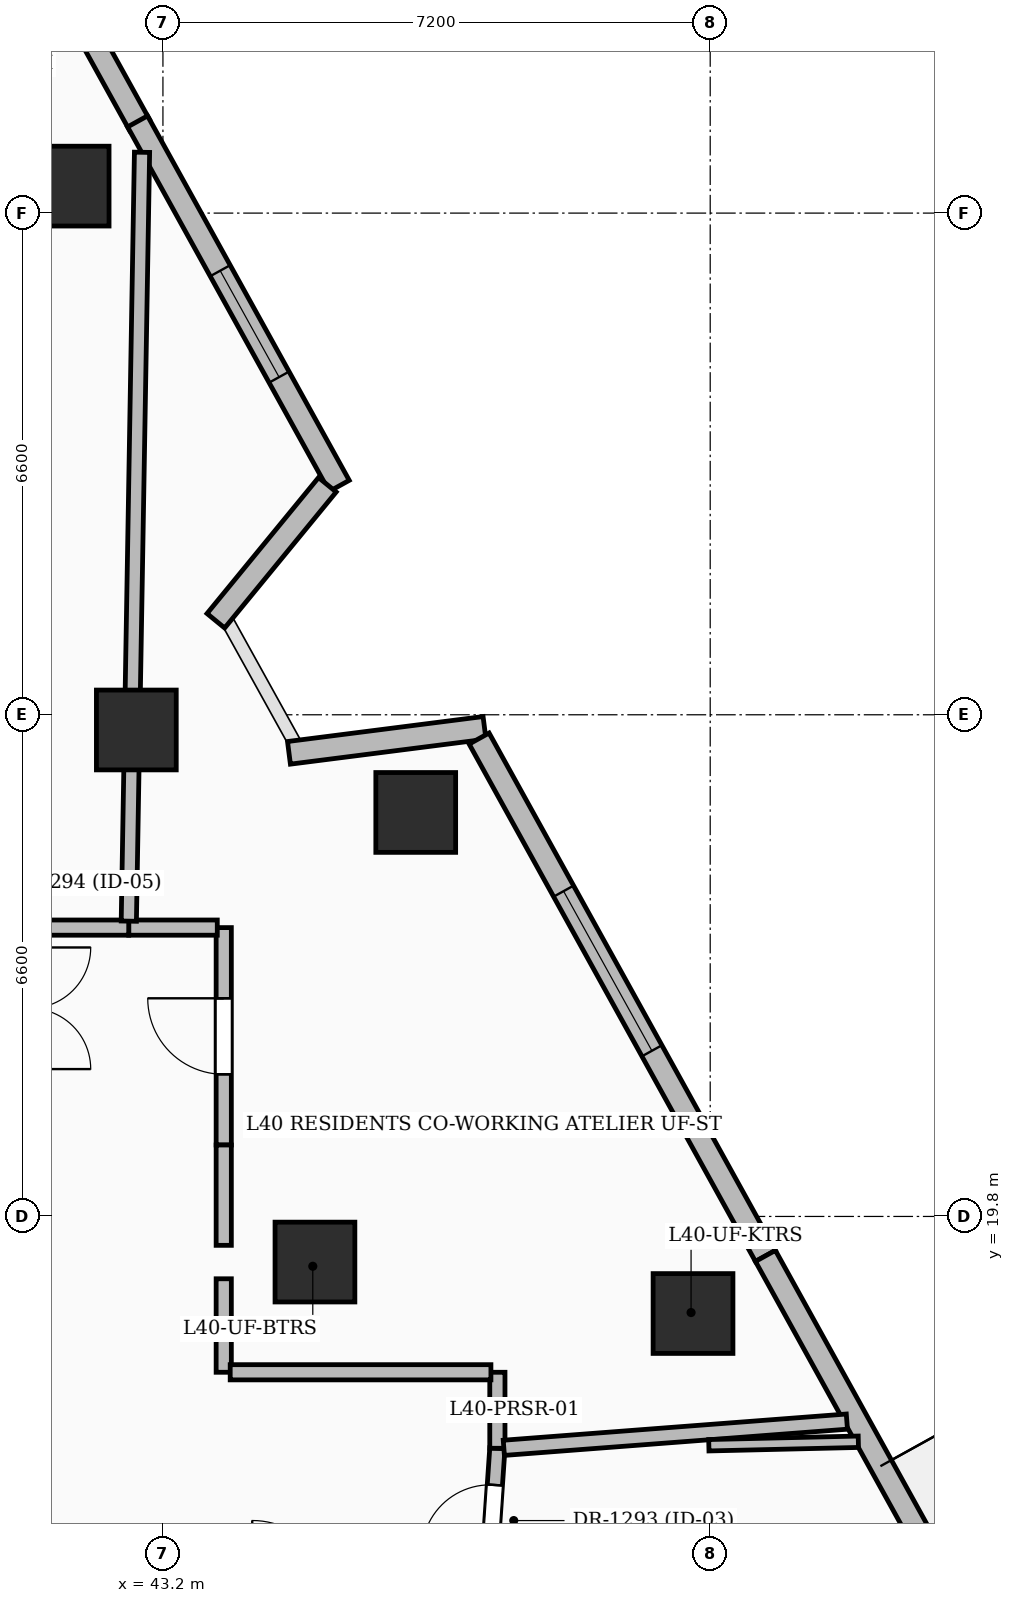
"""IFC4 building model, lengths in metres.
Left out: names, types, materials, properties, quantities, classifications, styles, units other than length and angle.
Written with IfcOpenShell. Run it as: python <this file> out.ifc"""

import sys

from ifc_helpers import new_model, si_unit, direction, frame, frame_2d, origin, origin_2d, place, context, subcontext, project, spatial, rectangle, extrude, element, fill, save


model = new_model("IFC4")
c1 = context("Model", 3, precision=1e-05, world=origin(), true_north=direction((0.0, 1.0)))
c2 = subcontext(c1, "Body", "Model", "MODEL_VIEW")
j1 = project(units=[si_unit("LENGTHUNIT", "METRE"), si_unit("PLANEANGLEUNIT", "RADIAN")], contexts=[c1])
p1 = place(None, origin())
s1 = spatial("IfcSite", under=j1, at=p1, CompositionType="ELEMENT")
p2 = place(p1, origin())
s2 = spatial("IfcBuilding", under=s1, at=p2, CompositionType="ELEMENT")
p3 = place(p2, frame((0.0, 0.0, 157.2)))
s3 = spatial("IfcBuildingStorey", under=s2, at=p3, CompositionType="ELEMENT", Elevation=157.2)
for number, where, z_axis, x_axis in (
    (1, (45.2, 19.2, 0.0), (0.0, 0.0, 1.0), (1.0, 0.0, 0.0)),
    (2, (42.85, 26.2, 0.0), (0.0, 0.0, 1.0), (1.0, 0.0, 0.0)),
    (3, (50.174, 18.523, 0.0), (0.0, 0.0, 1.0), (1.0, 0.0, 0.0)),
    (4, (46.526, 25.115, 0.0), (0.0, 0.0, 1.0), (1.0, 0.0, 0.0)),
    (5, (41.966, 33.355, 0.0), (0.0, 0.0, 1.0), (1.0, 0.0, 0.0)),
):
    element("IfcColumn", number, at=place(p3, frame(where, z_axis=z_axis, x_axis=x_axis)), inside=s3, PredefinedType="COLUMN", context=c2, shape_type="SweptSolid", body=[
        extrude(rectangle(XDim=1.05, YDim=1.05, at=origin_2d()), origin(), (0.0, 0.0, 1.0), 3.6),
    ])
p4 = place(p3, frame((40.155, 39.106, 0.0), z_axis=(0.0, 0.0, 1.0), x_axis=(0.484204903903, -0.874954633702, 0.0)))
e6 = element("IfcWall", 6, at=p4, inside=s3, PredefinedType="SOLIDWALL", context=c2, shape_type="SweptSolid", body=[
    extrude(rectangle(XDim=5.653, YDim=0.3, at=frame_2d((2.827, 0.0))), origin(), (0.0, 0.0, 1.0), 3.35),
])
p5 = place(p4, frame((1.91, 0.0, 0.6)))
e7 = element("IfcOpeningElement", 7, at=p5, cuts=e6, PredefinedType="OPENING", context=c2, shape_type="SweptSolid", body=[
    extrude(rectangle(XDim=1.8, YDim=2.1, at=frame_2d((0.9, 1.05))), frame((0.0, 0.16, 0.0), z_axis=(0.0, -1.0, 0.0), x_axis=(1.0, 0.0, 0.0)), (0.0, 0.0, 1.0), 0.32),
])
p6 = place(p3, frame((42.866, 34.206, 0.0), z_axis=(0.0, 0.0, 1.0), x_axis=(0.484193476584, -0.874960957548, 0.0)))
e8 = element("IfcWall", 8, at=p6, inside=s3, PredefinedType="SOLIDWALL", context=c2, shape_type="SweptSolid", body=[
    extrude(rectangle(XDim=5.48, YDim=0.3, at=frame_2d((2.74, 0.0))), origin(), (0.0, 0.0, 1.0), 3.35),
])
p7 = place(p6, frame((2.245, 0.0, 0.55)))
e9 = element("IfcOpeningElement", 9, at=p7, cuts=e8, PredefinedType="OPENING", context=c2, shape_type="SweptSolid", body=[
    extrude(rectangle(XDim=1.6, YDim=2.2, at=frame_2d((0.8, 1.1))), frame((0.0, 0.16, 0.0), z_axis=(0.0, -1.0, 0.0), x_axis=(1.0, 0.0, 0.0)), (0.0, 0.0, 1.0), 0.32),
])
p8 = place(p3, frame((45.363, 29.426, 0.0), z_axis=(0.0, 0.0, 1.0), x_axis=(-0.634082112051, -0.773265720937, 0.0)))
e10 = element("IfcWall", 10, at=p8, inside=s3, PredefinedType="SOLIDWALL", context=c2, shape_type="SweptSolid", body=[
    extrude(rectangle(XDim=2.314, YDim=0.3, at=frame_2d((1.157, 0.0))), origin(), (0.0, 0.0, 1.0), 2.575),
])
p9 = place(p3, frame((44.858, 25.899, 0.0), z_axis=(0.0, 0.0, 1.0), x_axis=(0.991953049751, 0.126606267974, 0.0)))
e11 = element("IfcWall", 11, at=p9, inside=s3, PredefinedType="SOLIDWALL", context=c2, shape_type="SweptSolid", body=[
    extrude(rectangle(XDim=2.594, YDim=0.3, at=frame_2d((1.297, 0.0))), origin(), (0.0, 0.0, 1.0), 2.575),
])
p10 = place(p3, frame((47.36, 26.087, 0.0), z_axis=(0.0, 0.0, 1.0), x_axis=(0.484182040501, -0.874967286049, 0.0)))
e12 = element("IfcWall", 12, at=p10, inside=s3, PredefinedType="SOLIDWALL", context=c2, shape_type="SweptSolid", body=[
    extrude(rectangle(XDim=7.779, YDim=0.3, at=frame_2d((3.89, 0.0))), origin(), (0.0, 0.0, 1.0), 3.35),
])
p11 = place(p10, frame((2.295, 0.0, 0.6)))
e13 = element("IfcOpeningElement", 13, at=p11, cuts=e12, PredefinedType="OPENING", context=c2, shape_type="SweptSolid", body=[
    extrude(rectangle(XDim=2.4, YDim=2.1, at=frame_2d((1.2, 1.05))), frame((0.0, 0.16, 0.0), z_axis=(0.0, -1.0, 0.0), x_axis=(1.0, 0.0, 0.0)), (0.0, 0.0, 1.0), 0.32),
])
p12 = place(p3, frame((51.126, 19.281, 0.0), z_axis=(0.0, 0.0, 1.0), x_axis=(0.484181305153, -0.87496769297, 0.0)))
e14 = element("IfcWall", 14, at=p12, inside=s3, PredefinedType="SOLIDWALL", context=c2, shape_type="SweptSolid", body=[
    extrude(rectangle(XDim=8.059, YDim=0.3, at=frame_2d((4.03, 0.0))), origin(), (0.0, 0.0, 1.0), 3.35),
])
p13 = place(p12, frame((5.335, 0.0, 0.0)))
e15 = element("IfcOpeningElement", 15, at=p13, cuts=e14, PredefinedType="OPENING", context=c2, shape_type="SweptSolid", body=[
    extrude(rectangle(XDim=1.0, YDim=2.2, at=frame_2d((0.5, 1.1))), frame((0.0, 0.16, 0.0), z_axis=(0.0, -1.0, 0.0), x_axis=(1.0, 0.0, 0.0)), (0.0, 0.0, 1.0), 0.32),
])
p14 = place(p3, frame((47.425, 14.2, 0.0), z_axis=(0.0, 0.0, 1.0), x_axis=(0.068484119878, 0.997652206595, 0.0)))
e16 = element("IfcWall", 16, at=p14, inside=s3, PredefinedType="PARTITIONING", context=c2, shape_type="SweptSolid", body=[
    extrude(rectangle(XDim=2.556, YDim=0.2, at=frame_2d((1.278, 0.0))), origin(), (0.0, 0.0, 1.0), 2.393),
])
p15 = place(p14, frame((1.172, 0.0, 0.0)))
e17 = element("IfcOpeningElement", 17, at=p15, cuts=e16, PredefinedType="OPENING", context=c2, shape_type="SweptSolid", body=[
    extrude(rectangle(XDim=0.9, YDim=2.1, at=frame_2d((0.45, 1.05))), frame((0.0, 0.11, 0.0), z_axis=(0.0, -1.0, 0.0), x_axis=(1.0, 0.0, 0.0)), (0.0, 0.0, 1.0), 0.22),
])
p16 = place(p3, frame((44.0, 20.74, 0.0), z_axis=(0.0, 0.0, 1.0), x_axis=(0.0, 1.0, 0.0)))
e18 = element("IfcWall", 18, at=p16, inside=s3, PredefinedType="PARTITIONING", context=c2, shape_type="SweptSolid", body=[
    extrude(rectangle(XDim=2.86, YDim=0.2, at=frame_2d((1.43, 0.0))), origin(), (0.0, 0.0, 1.0), 2.436),
])
p17 = place(p16, frame((0.93, 0.0, 0.0)))
e19 = element("IfcOpeningElement", 19, at=p17, cuts=e18, PredefinedType="OPENING", context=c2, shape_type="SweptSolid", body=[
    extrude(rectangle(XDim=1.0, YDim=2.2, at=frame_2d((0.5, 1.1))), frame((0.0, 0.11, 0.0), z_axis=(0.0, -1.0, 0.0), x_axis=(1.0, 0.0, 0.0)), (0.0, 0.0, 1.0), 0.22),
])
p18 = place(p3, frame((43.915, 23.6, 0.0), z_axis=(0.0, 0.0, 1.0), x_axis=(-1.0, 0.0, 0.0)))
e20 = element("IfcWall", 20, at=p18, inside=s3, PredefinedType="PARTITIONING", context=c2, shape_type="SweptSolid", body=[
    extrude(rectangle(XDim=1.165, YDim=0.2, at=frame_2d((0.583, 0.0))), origin(), (0.0, 0.0, 1.0), 2.436),
])
p19 = place(p3, frame((47.6, 16.75, 0.0), z_axis=(0.0, 0.0, 1.0), x_axis=(0.0, 1.0, 0.0)))
e21 = element("IfcWall", 21, at=p19, inside=s3, PredefinedType="PARTITIONING", context=c2, shape_type="SweptSolid", body=[
    extrude(rectangle(XDim=1.0, YDim=0.2, at=frame_2d((0.5, 0.0))), origin(), (0.0, 0.0, 1.0), 3.01),
])
p20 = place(p3, frame((44.0, 17.75, 0.0), z_axis=(0.0, 0.0, 1.0), x_axis=(0.0, 1.0, 0.0)))
e22 = element("IfcWall", 22, at=p20, inside=s3, PredefinedType="PARTITIONING", context=c2, shape_type="SweptSolid", body=[
    extrude(rectangle(XDim=1.23, YDim=0.2, at=frame_2d((0.615, 0.0))), origin(), (0.0, 0.0, 1.0), 3.35),
])
p21 = place(p3, frame((42.75, 23.6, 0.0), z_axis=(0.0, 0.0, 1.0), x_axis=(-1.0, 0.0, 0.0)))
e23 = element("IfcWall", 23, at=p21, inside=s3, PredefinedType="PARTITIONING", context=c2, shape_type="SweptSolid", body=[
    extrude(rectangle(XDim=1.3, YDim=0.2, at=frame_2d((0.65, 0.0))), origin(), (0.0, 0.0, 1.0), 3.35),
])
p22 = place(p3, frame((52.198, 17.101, 0.0), z_axis=(0.0, 0.0, 1.0), x_axis=(-0.997091490512, -0.076213906529, 0.0)))
e24 = element("IfcWall", 24, at=p22, inside=s3, PredefinedType="PARTITIONING", context=c2, shape_type="SweptSolid", body=[
    extrude(rectangle(XDim=4.526, YDim=0.2, at=frame_2d((2.263, 0.0))), origin(), (0.0, 0.0, 1.0), 2.393),
])
p23 = place(p3, frame((42.925, 33.8, 0.0), z_axis=(0.0, 0.0, 1.0), x_axis=(-0.017206788201, -0.999851952261, 0.0)))
e25 = element("IfcWall", 25, at=p23, inside=s3, PredefinedType="PARTITIONING", context=c2, shape_type="SweptSolid", body=[
    extrude(rectangle(XDim=10.116, YDim=0.2, at=frame_2d((5.058, 0.0))), origin(), (0.0, 0.0, 1.0), 2.393),
])
p24 = place(p3, frame((47.515, 17.75, 0.0), z_axis=(0.0, 0.0, 1.0), x_axis=(-1.0, 0.0, 0.0)))
e26 = element("IfcWall", 26, at=p24, inside=s3, PredefinedType="PARTITIONING", context=c2, shape_type="SweptSolid", body=[
    extrude(rectangle(XDim=3.43, YDim=0.2, at=frame_2d((1.715, 0.0))), origin(), (0.0, 0.0, 1.0), 2.436),
])
p25 = place(p3, frame((44.0, 19.42, 0.0), z_axis=(0.0, 0.0, 1.0), x_axis=(0.0, 1.0, 0.0)))
e27 = element("IfcWall", 27, at=p25, inside=s3, PredefinedType="PARTITIONING", context=c2, shape_type="SweptSolid", body=[
    extrude(rectangle(XDim=1.32, YDim=0.2, at=frame_2d((0.66, 0.0))), origin(), (0.0, 0.0, 1.0), 3.35),
])
p26 = place(p3, frame((52.349, 16.836, 0.0), z_axis=(0.0, 0.0, 1.0), x_axis=(-0.999727879239, -0.023327397455, 0.0)))
e28 = element("IfcWall", 28, at=p26, inside=s3, PredefinedType="PARTITIONING", context=c2, shape_type="SweptSolid", body=[
    extrude(rectangle(XDim=1.968, YDim=0.15, at=frame_2d((0.984, 0.0))), origin(), (0.0, 0.0, 1.0), 2.393),
])
p27 = place(p7, origin())
e29 = element("IfcWindow", 29, at=p27, inside=s3, PartitioningType="SINGLE_PANEL", PredefinedType="WINDOW", context=c2, shape_type="SweptSolid", body=[
    extrude(rectangle(XDim=1.6, YDim=2.2, at=frame_2d((0.8, 1.1))), frame((0.0, 0.03, 0.0), z_axis=(0.0, -1.0, 0.0), x_axis=(1.0, 0.0, 0.0)), (0.0, 0.0, 1.0), 0.06),
])
fill(e9, e29)
p28 = place(p11, origin())
e30 = element("IfcWindow", 30, at=p28, inside=s3, PartitioningType="SINGLE_PANEL", PredefinedType="WINDOW", context=c2, shape_type="SweptSolid", body=[
    extrude(rectangle(XDim=2.4, YDim=2.1, at=frame_2d((1.2, 1.05))), frame((0.0, 0.03, 0.0), z_axis=(0.0, -1.0, 0.0), x_axis=(1.0, 0.0, 0.0)), (0.0, 0.0, 1.0), 0.06),
])
fill(e13, e30)
p29 = place(p15, origin())
e31 = element("IfcDoor", 31, at=p29, inside=s3, OperationType="SINGLE_SWING_LEFT", PredefinedType="DOOR", context=c2, shape_type="SweptSolid", body=[
    extrude(rectangle(XDim=0.9, YDim=2.1, at=frame_2d((0.45, 1.05))), frame((0.0, 0.025, 0.0), z_axis=(0.0, -1.0, 0.0), x_axis=(1.0, 0.0, 0.0)), (0.0, 0.0, 1.0), 0.05),
])
fill(e17, e31)
p30 = place(p17, origin())
e32 = element("IfcDoor", 32, at=p30, inside=s3, OperationType="SINGLE_SWING_RIGHT", PredefinedType="DOOR", context=c2, shape_type="SweptSolid", body=[
    extrude(rectangle(XDim=1.0, YDim=2.2, at=frame_2d((0.5, 1.1))), frame((0.0, 0.025, 0.0), z_axis=(0.0, -1.0, 0.0), x_axis=(1.0, 0.0, 0.0)), (0.0, 0.0, 1.0), 0.05),
])
fill(e19, e32)
save(model, sys.argv[1])
